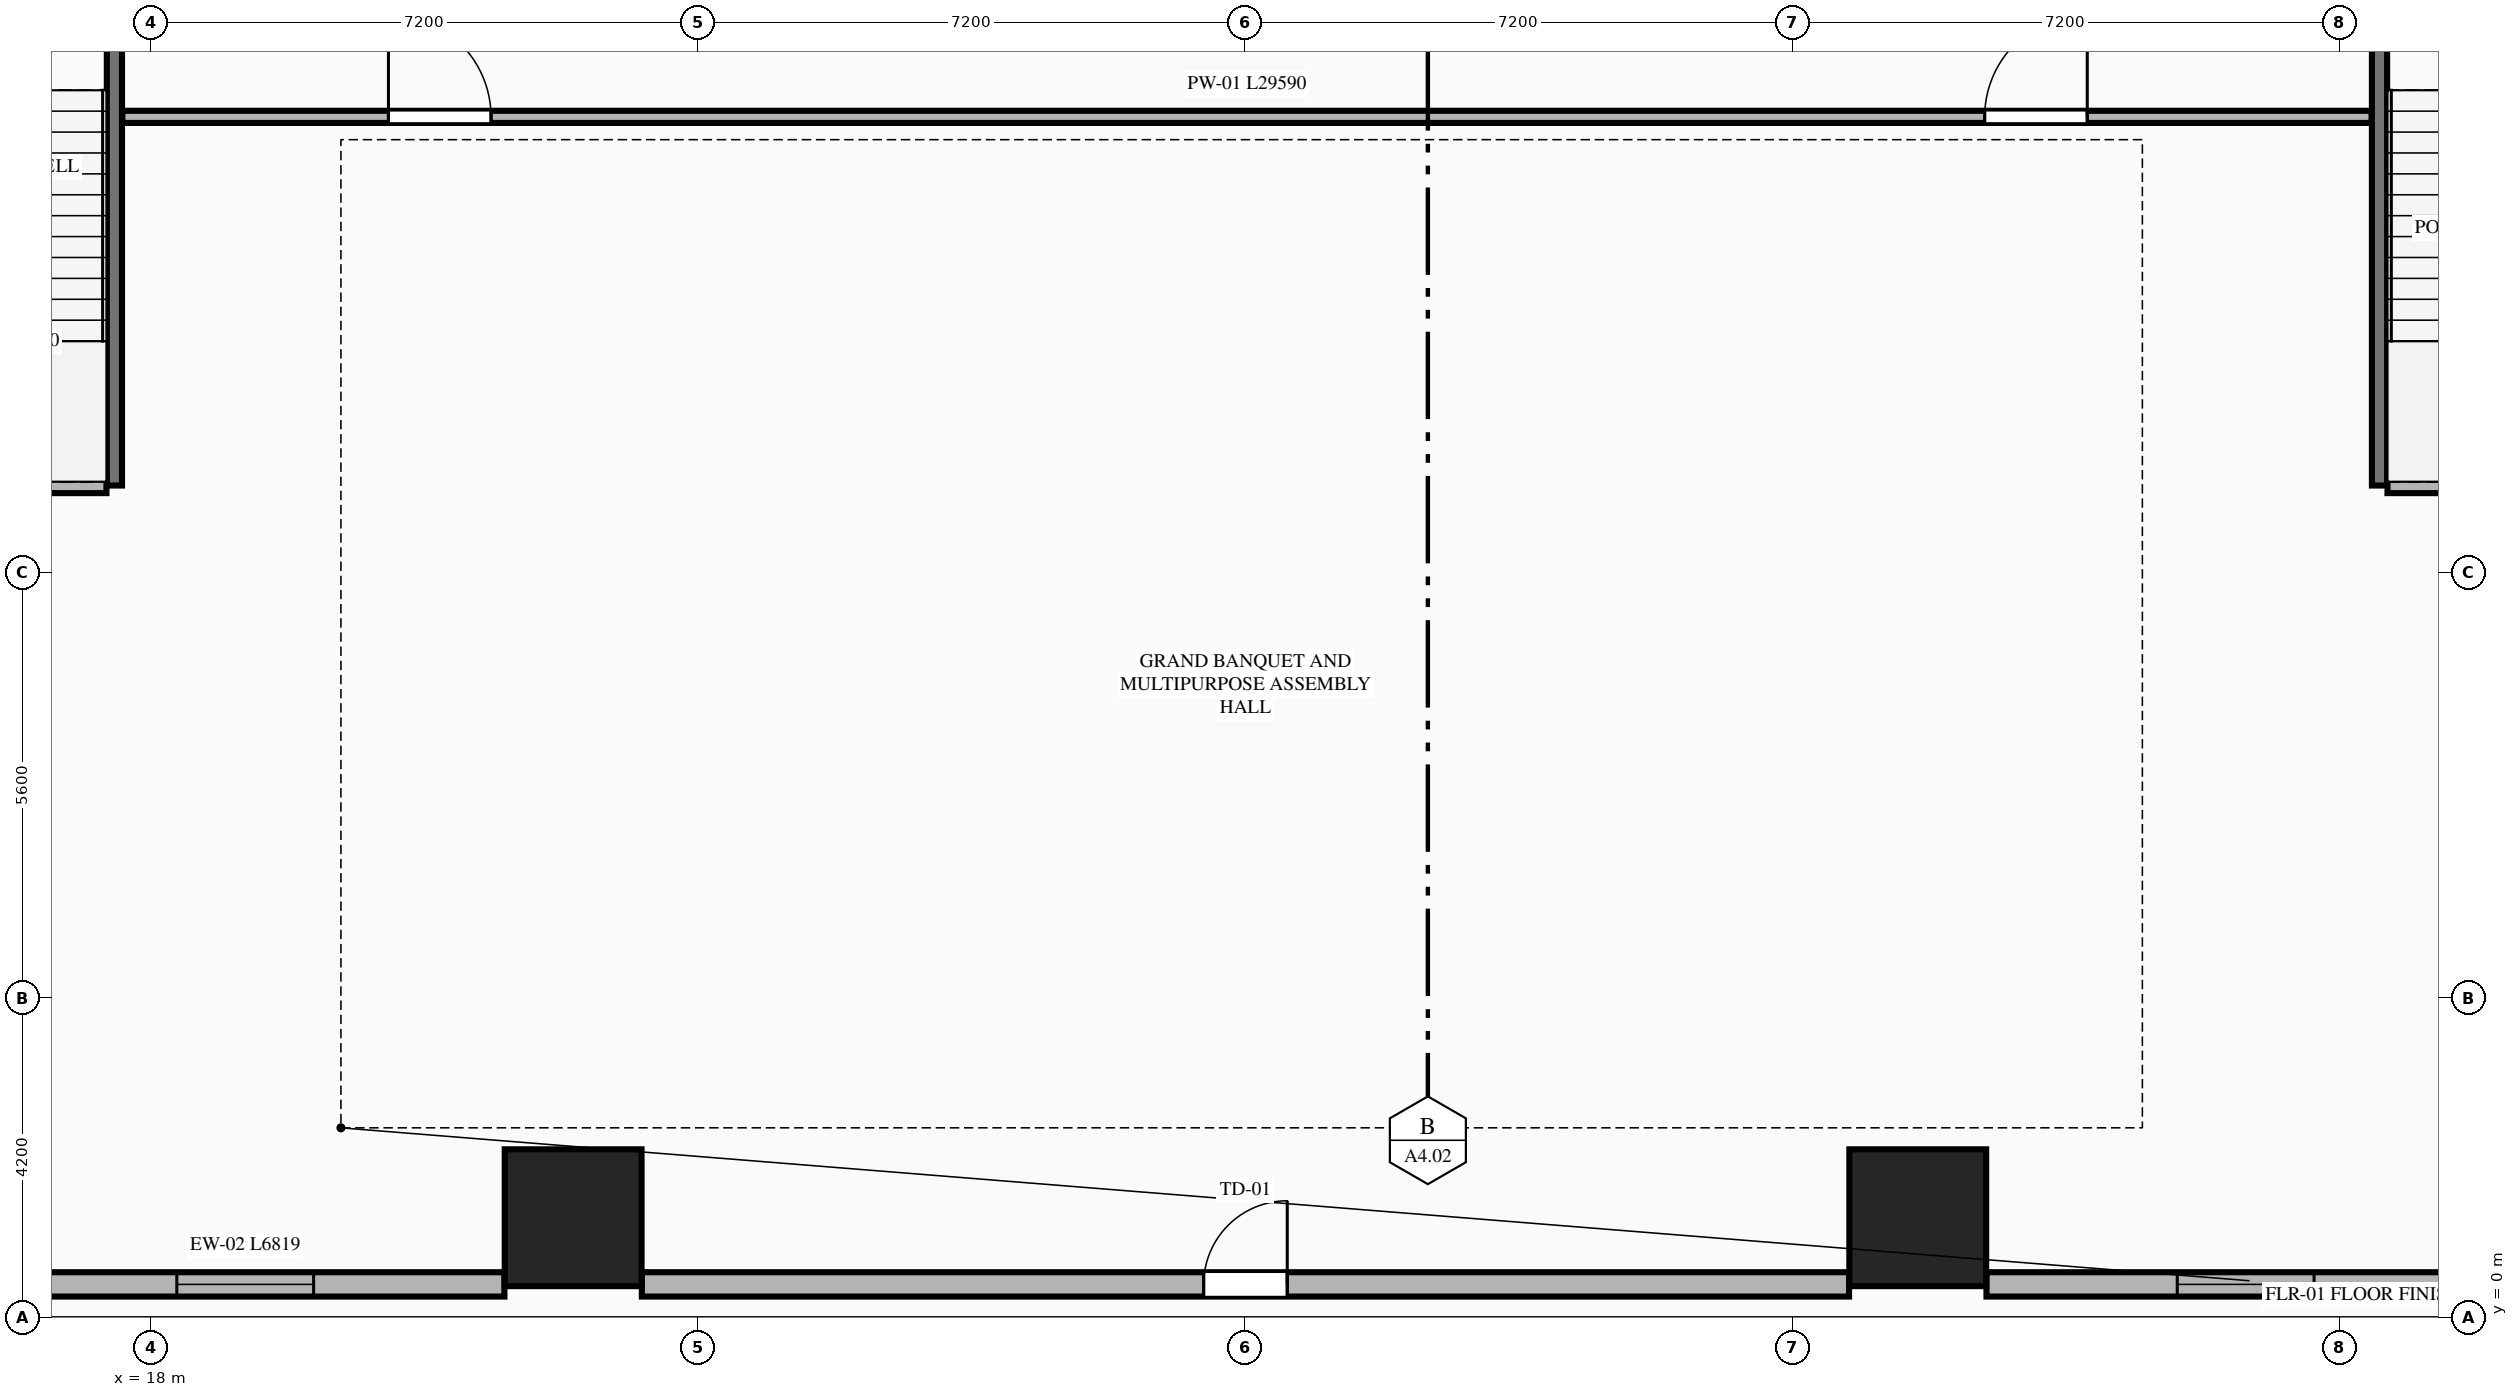
"""IFC4 building model, lengths in metres.
Left out: names, types, materials, properties, quantities, classifications, styles, units other than length and angle.
Written with IfcOpenShell. Run it as: python <this file> out.ifc"""

import sys

from ifc_helpers import new_model, si_unit, direction, frame, frame_2d, origin, origin_2d, place, context, subcontext, project, spatial, rectangle, extrude, element, fill, save


model = new_model("IFC4")
c1 = context("Model", 3, precision=1e-05, world=origin(), true_north=direction((0.0, 1.0)))
c2 = subcontext(c1, "Body", "Model", "MODEL_VIEW")
j1 = project(units=[si_unit("LENGTHUNIT", "METRE"), si_unit("PLANEANGLEUNIT", "RADIAN")], contexts=[c1])
p1 = place(None, origin())
s1 = spatial("IfcSite", under=j1, at=p1, CompositionType="ELEMENT")
p2 = place(p1, origin())
s2 = spatial("IfcBuilding", under=s1, at=p2, CompositionType="ELEMENT")
p3 = place(p2, frame((0.0, 0.0, 10.5)))
s3 = spatial("IfcBuildingStorey", under=s2, at=p3, CompositionType="ELEMENT", Elevation=10.5)
for number, where, z_axis, x_axis in (
    (1, (23.555, 1.317, 0.0), (0.0, 0.0, 1.0), (1.0, 0.0, 0.0)),
    (2, (41.245, 1.317, 0.0), (0.0, 0.0, 1.0), (1.0, 0.0, 0.0)),
):
    element("IfcColumn", number, at=place(p3, frame(where, z_axis=z_axis, x_axis=x_axis)), inside=s3, PredefinedType="COLUMN", context=c2, shape_type="SweptSolid", body=[
        extrude(rectangle(XDim=1.8, YDim=1.8, at=origin_2d()), origin(), (0.0, 0.0, 1.0), 4.5),
    ])
p4 = place(p3, frame((17.52, 10.95, 0.0), z_axis=(0.0, 0.0, 1.0), x_axis=(0.0, 1.0, 0.0)))
e3 = element("IfcWall", 3, at=p4, inside=s3, PredefinedType="SHEAR", context=c2, shape_type="SweptSolid", body=[
    extrude(rectangle(XDim=6.85, YDim=0.2, at=frame_2d((3.425, 0.0))), origin(), (0.0, 0.0, 1.0), 4.5),
])
p5 = place(p3, frame((14.225, 10.95, 0.0), z_axis=(0.0, 0.0, 1.0), x_axis=(1.0, 0.0, 0.0)))
e4 = element("IfcWall", 4, at=p5, inside=s3, PredefinedType="PLUMBINGWALL", context=c2, shape_type="SweptSolid", body=[
    extrude(rectangle(XDim=3.19, YDim=0.2, at=frame_2d((1.595, 0.0))), origin(), (0.0, 0.0, 1.0), 4.25),
])
p6 = place(p3, frame((47.32, 10.95, 0.0), z_axis=(0.0, 0.0, 1.0), x_axis=(0.0, 1.0, 0.0)))
e5 = element("IfcWall", 5, at=p6, inside=s3, PredefinedType="SHEAR", context=c2, shape_type="SweptSolid", body=[
    extrude(rectangle(XDim=6.85, YDim=0.2, at=frame_2d((3.425, 0.0))), origin(), (0.0, 0.0, 1.0), 4.5),
])
p7 = place(p3, frame((47.425, 10.95, 0.0), z_axis=(0.0, 0.0, 1.0), x_axis=(1.0, 0.0, 0.0)))
e6 = element("IfcWall", 6, at=p7, inside=s3, PredefinedType="PLUMBINGWALL", context=c2, shape_type="SweptSolid", body=[
    extrude(rectangle(XDim=3.19, YDim=0.2, at=frame_2d((1.595, 0.0))), origin(), (0.0, 0.0, 1.0), 4.25),
])
p8 = place(p3, frame((17.625, 15.8, 0.0), z_axis=(0.0, 0.0, 1.0), x_axis=(1.0, 0.0, 0.0)))
e7 = element("IfcWall", 7, at=p8, inside=s3, PredefinedType="PARTITIONING", context=c2, shape_type="SweptSolid", body=[
    extrude(rectangle(XDim=29.59, YDim=0.16, at=frame_2d((14.795, 0.0))), origin(), (0.0, 0.0, 1.0), 4.25),
])
p9 = place(p8, frame((3.5, 0.0, 0.0)))
e8 = element("IfcOpeningElement", 8, at=p9, cuts=e7, PredefinedType="OPENING", context=c2, shape_type="SweptSolid", body=[
    extrude(rectangle(XDim=1.35, YDim=2.35, at=frame_2d((0.675, 1.175))), frame((0.0, 0.09, 0.0), z_axis=(0.0, -1.0, 0.0), x_axis=(1.0, 0.0, 0.0)), (0.0, 0.0, 1.0), 0.18),
])
p10 = place(p8, frame((24.5, 0.0, 0.0)))
e9 = element("IfcOpeningElement", 9, at=p10, cuts=e7, PredefinedType="OPENING", context=c2, shape_type="SweptSolid", body=[
    extrude(rectangle(XDim=1.35, YDim=2.35, at=frame_2d((0.675, 1.175))), frame((0.0, 0.09, 0.0), z_axis=(0.0, -1.0, 0.0), x_axis=(1.0, 0.0, 0.0)), (0.0, 0.0, 1.0), 0.18),
])
p11 = place(p3, frame((15.832, 0.44, 0.0), z_axis=(0.0, 0.0, 1.0), x_axis=(1.0, 0.0, 0.0)))
e10 = element("IfcWall", 10, at=p11, inside=s3, PredefinedType="STANDARD", context=c2, shape_type="SweptSolid", body=[
    extrude(rectangle(XDim=6.819, YDim=0.32, at=frame_2d((3.409, 0.0))), origin(), (0.0, 0.0, 1.0), 4.25),
])
p12 = place(p11, frame((2.509, 0.0, 0.75)))
e11 = element("IfcOpeningElement", 11, at=p12, cuts=e10, PredefinedType="OPENING", context=c2, shape_type="SweptSolid", body=[
    extrude(rectangle(XDim=1.8, YDim=2.4, at=frame_2d((0.9, 1.2))), frame((0.0, 0.17, 0.0), z_axis=(0.0, -1.0, 0.0), x_axis=(1.0, 0.0, 0.0)), (0.0, 0.0, 1.0), 0.34),
])
p13 = place(p3, frame((24.459, 0.44, 0.0), z_axis=(0.0, 0.0, 1.0), x_axis=(1.0, 0.0, 0.0)))
e12 = element("IfcWall", 12, at=p13, inside=s3, PredefinedType="STANDARD", context=c2, shape_type="SweptSolid", body=[
    extrude(rectangle(XDim=15.882, YDim=0.32, at=frame_2d((7.941, 0.0))), origin(), (0.0, 0.0, 1.0), 4.25),
])
p14 = place(p13, frame((7.391, 0.0, 0.0)))
e13 = element("IfcOpeningElement", 13, at=p14, cuts=e12, PredefinedType="OPENING", context=c2, shape_type="SweptSolid", body=[
    extrude(rectangle(XDim=1.1, YDim=2.25, at=frame_2d((0.55, 1.125))), frame((0.0, 0.17, 0.0), z_axis=(0.0, -1.0, 0.0), x_axis=(1.0, 0.0, 0.0)), (0.0, 0.0, 1.0), 0.34),
])
p15 = place(p3, frame((42.149, 0.44, 0.0), z_axis=(0.0, 0.0, 1.0), x_axis=(1.0, 0.0, 0.0)))
e14 = element("IfcWall", 14, at=p15, inside=s3, PredefinedType="STANDARD", context=c2, shape_type="SweptSolid", body=[
    extrude(rectangle(XDim=6.819, YDim=0.32, at=frame_2d((3.41, 0.0))), origin(), (0.0, 0.0, 1.0), 4.25),
])
p16 = place(p15, frame((2.51, 0.0, 0.75)))
e15 = element("IfcOpeningElement", 15, at=p16, cuts=e14, PredefinedType="OPENING", context=c2, shape_type="SweptSolid", body=[
    extrude(rectangle(XDim=1.8, YDim=2.4, at=frame_2d((0.9, 1.2))), frame((0.0, 0.17, 0.0), z_axis=(0.0, -1.0, 0.0), x_axis=(1.0, 0.0, 0.0)), (0.0, 0.0, 1.0), 0.34),
])
p17 = place(p9, origin())
e16 = element("IfcDoor", 16, at=p17, inside=s3, OperationType="SINGLE_SWING_LEFT", PredefinedType="DOOR", context=c2, shape_type="SweptSolid", body=[
    extrude(rectangle(XDim=1.35, YDim=2.35, at=frame_2d((0.675, 1.175))), frame((0.0, 0.025, 0.0), z_axis=(0.0, -1.0, 0.0), x_axis=(1.0, 0.0, 0.0)), (0.0, 0.0, 1.0), 0.05),
])
fill(e8, e16)
p18 = place(p10, origin())
e17 = element("IfcDoor", 17, at=p18, inside=s3, OperationType="SINGLE_SWING_RIGHT", PredefinedType="DOOR", context=c2, shape_type="SweptSolid", body=[
    extrude(rectangle(XDim=1.35, YDim=2.35, at=frame_2d((0.675, 1.175))), frame((0.0, 0.025, 0.0), z_axis=(0.0, -1.0, 0.0), x_axis=(1.0, 0.0, 0.0)), (0.0, 0.0, 1.0), 0.05),
])
fill(e9, e17)
p19 = place(p12, origin())
e18 = element("IfcWindow", 18, at=p19, inside=s3, PartitioningType="SINGLE_PANEL", PredefinedType="WINDOW", context=c2, shape_type="SweptSolid", body=[
    extrude(rectangle(XDim=1.8, YDim=2.4, at=frame_2d((0.9, 1.2))), frame((0.0, 0.03, 0.0), z_axis=(0.0, -1.0, 0.0), x_axis=(1.0, 0.0, 0.0)), (0.0, 0.0, 1.0), 0.06),
])
fill(e11, e18)
p20 = place(p14, origin())
e19 = element("IfcDoor", 19, at=p20, inside=s3, OperationType="SINGLE_SWING_RIGHT", PredefinedType="DOOR", context=c2, shape_type="SweptSolid", body=[
    extrude(rectangle(XDim=1.1, YDim=2.25, at=frame_2d((0.55, 1.125))), frame((0.0, 0.025, 0.0), z_axis=(0.0, -1.0, 0.0), x_axis=(1.0, 0.0, 0.0)), (0.0, 0.0, 1.0), 0.05),
])
fill(e13, e19)
p21 = place(p16, origin())
e20 = element("IfcWindow", 20, at=p21, inside=s3, PartitioningType="SINGLE_PANEL", PredefinedType="WINDOW", context=c2, shape_type="SweptSolid", body=[
    extrude(rectangle(XDim=1.8, YDim=2.4, at=frame_2d((0.9, 1.2))), frame((0.0, 0.03, 0.0), z_axis=(0.0, -1.0, 0.0), x_axis=(1.0, 0.0, 0.0)), (0.0, 0.0, 1.0), 0.06),
])
fill(e15, e20)
save(model, sys.argv[1])
